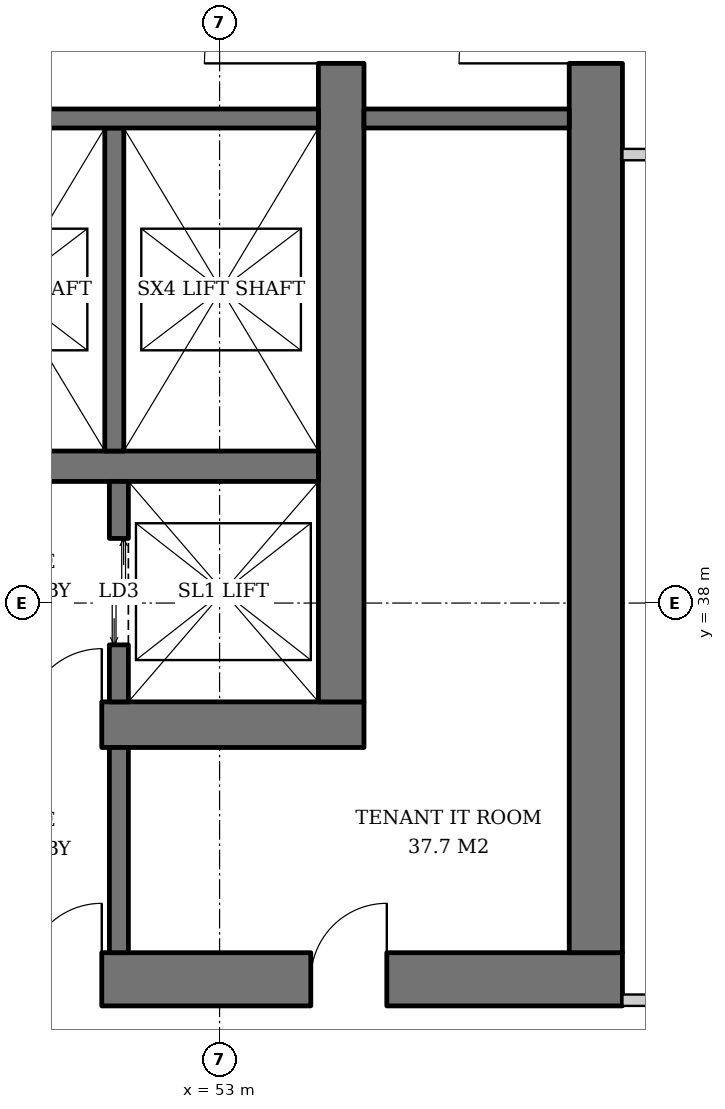
"""IFC4 building model, lengths in metres.
Left out: names, types, materials, properties, quantities, classifications, styles, units other than length and angle.
Written with IfcOpenShell. Run it as: python <this file> out.ifc"""

import sys

from ifc_helpers import new_model, si_unit, direction, frame, frame_2d, origin, place, context, subcontext, project, spatial, rectangle, extrude, element, fill, save


model = new_model("IFC4")
c1 = context("Model", 3, precision=1e-05, world=origin(), true_north=direction((0.0, 1.0)))
c2 = subcontext(c1, "Body", "Model", "MODEL_VIEW")
j1 = project(units=[si_unit("LENGTHUNIT", "METRE"), si_unit("PLANEANGLEUNIT", "RADIAN")], contexts=[c1])
p1 = place(None, origin())
s1 = spatial("IfcSite", under=j1, at=p1, CompositionType="ELEMENT")
p2 = place(p1, origin())
s2 = spatial("IfcBuilding", under=s1, at=p2, CompositionType="ELEMENT")
p3 = place(p2, frame((0.0, 0.0, 123.6)))
s3 = spatial("IfcBuildingStorey", under=s2, at=p3, CompositionType="ELEMENT", Elevation=123.6)
p4 = place(p3, frame((35.1, 36.4, 0.0), z_axis=(0.0, 0.0, 1.0), x_axis=(1.0, 0.0, 0.0)))
e1 = element("IfcWall", 1, at=p4, inside=s3, PredefinedType="SHEAR", context=c2, shape_type="SweptSolid", body=[
    extrude(rectangle(XDim=19.8, YDim=0.6, at=frame_2d((9.9, 0.0))), origin(), (0.0, 0.0, 1.0), 3.8),
])
p5 = place(p4, frame((3.9, 0.0, 0.0)))
e2 = element("IfcOpeningElement", 2, at=p5, cuts=e1, PredefinedType="OPENING", context=c2, shape_type="SweptSolid", body=[
    extrude(rectangle(XDim=1.0, YDim=2.1, at=frame_2d((0.5, 1.05))), frame((0.0, 0.31, 0.0), z_axis=(0.0, -1.0, 0.0), x_axis=(1.0, 0.0, 0.0)), (0.0, 0.0, 1.0), 0.62),
])
p6 = place(p4, frame((15.35, 0.0, 0.0)))
e3 = element("IfcOpeningElement", 3, at=p6, cuts=e1, PredefinedType="OPENING", context=c2, shape_type="SweptSolid", body=[
    extrude(rectangle(XDim=1.0, YDim=2.1, at=frame_2d((0.5, 1.05))), frame((0.0, 0.31, 0.0), z_axis=(0.0, -1.0, 0.0), x_axis=(1.0, 0.0, 0.0)), (0.0, 0.0, 1.0), 0.62),
])
p7 = place(p3, frame((54.6, 36.7, 0.0), z_axis=(0.0, 0.0, 1.0), x_axis=(0.0, 1.0, 0.0)))
e4 = element("IfcWall", 4, at=p7, inside=s3, PredefinedType="SHEAR", context=c2, shape_type="SweptSolid", body=[
    extrude(rectangle(XDim=18.6, YDim=0.6, at=frame_2d((9.3, 0.0))), origin(), (0.0, 0.0, 1.0), 3.8),
])
p8 = place(p7, frame((8.4, 0.0, 0.0)))
e5 = element("IfcOpeningElement", 5, at=p8, cuts=e4, PredefinedType="OPENING", context=c2, shape_type="SweptSolid", body=[
    extrude(rectangle(XDim=1.8, YDim=2.4, at=frame_2d((0.9, 1.2))), frame((0.0, 0.31, 0.0), z_axis=(0.0, -1.0, 0.0), x_axis=(1.0, 0.0, 0.0)), (0.0, 0.0, 1.0), 0.62),
])
p9 = place(p3, frame((31.7, 33.05, 0.0), z_axis=(0.0, 0.0, 1.0), x_axis=(1.0, 0.0, 0.0)))
e6 = element("IfcWall", 6, at=p9, inside=s3, PredefinedType="SHEAR", context=c2, shape_type="SweptSolid", body=[
    extrude(rectangle(XDim=26.6, YDim=0.7, at=frame_2d((13.3, 0.0))), origin(), (0.0, 0.0, 1.0), 3.8),
])
p10 = place(p9, frame((7.3, 0.0, 0.0)))
e7 = element("IfcOpeningElement", 7, at=p10, cuts=e6, PredefinedType="OPENING", context=c2, shape_type="SweptSolid", body=[
    extrude(rectangle(XDim=1.0, YDim=2.1, at=frame_2d((0.5, 1.05))), frame((0.0, 0.36, 0.0), z_axis=(0.0, -1.0, 0.0), x_axis=(1.0, 0.0, 0.0)), (0.0, 0.0, 1.0), 0.72),
])
p11 = place(p9, frame((18.75, 0.0, 0.0)))
e8 = element("IfcOpeningElement", 8, at=p11, cuts=e6, PredefinedType="OPENING", context=c2, shape_type="SweptSolid", body=[
    extrude(rectangle(XDim=1.0, YDim=2.1, at=frame_2d((0.5, 1.05))), frame((0.0, 0.36, 0.0), z_axis=(0.0, -1.0, 0.0), x_axis=(1.0, 0.0, 0.0)), (0.0, 0.0, 1.0), 0.72),
])
p12 = place(p9, frame((3.2, 0.0, 0.0)))
e9 = element("IfcOpeningElement", 9, at=p12, cuts=e6, PredefinedType="OPENING", context=c2, shape_type="SweptSolid", body=[
    extrude(rectangle(XDim=1.0, YDim=2.1, at=frame_2d((0.5, 1.05))), frame((0.0, 0.36, 0.0), z_axis=(0.0, -1.0, 0.0), x_axis=(1.0, 0.0, 0.0)), (0.0, 0.0, 1.0), 0.72),
])
p13 = place(p9, frame((10.42, 0.0, 0.0)))
e10 = element("IfcOpeningElement", 10, at=p13, cuts=e6, PredefinedType="OPENING", context=c2, shape_type="SweptSolid", body=[
    extrude(rectangle(XDim=1.0, YDim=2.1, at=frame_2d((0.5, 1.05))), frame((0.0, 0.36, 0.0), z_axis=(0.0, -1.0, 0.0), x_axis=(1.0, 0.0, 0.0)), (0.0, 0.0, 1.0), 0.72),
])
p14 = place(p9, frame((14.46, 0.0, 0.0)))
e11 = element("IfcOpeningElement", 11, at=p14, cuts=e6, PredefinedType="OPENING", context=c2, shape_type="SweptSolid", body=[
    extrude(rectangle(XDim=1.0, YDim=2.1, at=frame_2d((0.5, 1.05))), frame((0.0, 0.36, 0.0), z_axis=(0.0, -1.0, 0.0), x_axis=(1.0, 0.0, 0.0)), (0.0, 0.0, 1.0), 0.72),
])
p15 = place(p9, frame((22.5, 0.0, 0.0)))
e12 = element("IfcOpeningElement", 12, at=p15, cuts=e6, PredefinedType="OPENING", context=c2, shape_type="SweptSolid", body=[
    extrude(rectangle(XDim=1.0, YDim=2.1, at=frame_2d((0.5, 1.05))), frame((0.0, 0.36, 0.0), z_axis=(0.0, -1.0, 0.0), x_axis=(1.0, 0.0, 0.0)), (0.0, 0.0, 1.0), 0.72),
])
p16 = place(p3, frame((57.95, 33.4, 0.0), z_axis=(0.0, 0.0, 1.0), x_axis=(0.0, 1.0, 0.0)))
e13 = element("IfcWall", 13, at=p16, inside=s3, PredefinedType="SHEAR", context=c2, shape_type="SweptSolid", body=[
    extrude(rectangle(XDim=25.2, YDim=0.7, at=frame_2d((12.6, 0.0))), origin(), (0.0, 0.0, 1.0), 3.8),
])
p17 = place(p16, frame((11.7, 0.0, 0.0)))
e14 = element("IfcOpeningElement", 14, at=p17, cuts=e13, PredefinedType="OPENING", context=c2, shape_type="SweptSolid", body=[
    extrude(rectangle(XDim=1.8, YDim=2.4, at=frame_2d((0.9, 1.2))), frame((0.0, 0.36, 0.0), z_axis=(0.0, -1.0, 0.0), x_axis=(1.0, 0.0, 0.0)), (0.0, 0.0, 1.0), 0.72),
])
p18 = place(p3, frame((35.7, 39.8, 0.0), z_axis=(0.0, 0.0, 1.0), x_axis=(1.0, 0.0, 0.0)))
e15 = element("IfcWall", 15, at=p18, inside=s3, PredefinedType="SHEAR", context=c2, shape_type="SweptSolid", body=[
    extrude(rectangle(XDim=18.6, YDim=0.4, at=frame_2d((9.3, 0.0))), origin(), (0.0, 0.0, 1.0), 3.8),
])
p19 = place(p3, frame((51.675, 36.7, 0.0), z_axis=(0.0, 0.0, 1.0), x_axis=(0.0, 1.0, 0.0)))
e16 = element("IfcWall", 16, at=p19, inside=s3, PredefinedType="SHEAR", context=c2, shape_type="SweptSolid", body=[
    extrude(rectangle(XDim=2.9, YDim=0.25, at=frame_2d((1.45, 0.0))), origin(), (0.0, 0.0, 1.0), 3.8),
])
p20 = place(p19, frame((0.75, 0.0, 0.0)))
e17 = element("IfcOpeningElement", 17, at=p20, cuts=e16, PredefinedType="OPENING", context=c2, shape_type="SweptSolid", body=[
    extrude(rectangle(XDim=1.4, YDim=2.4, at=frame_2d((0.7, 1.2))), frame((0.0, 0.135, 0.0), z_axis=(0.0, -1.0, 0.0), x_axis=(1.0, 0.0, 0.0)), (0.0, 0.0, 1.0), 0.27),
])
p21 = place(p3, frame((51.615, 44.25, 0.0), z_axis=(0.0, 0.0, 1.0), x_axis=(0.0, -1.0, 0.0)))
e18 = element("IfcWall", 18, at=p21, inside=s3, PredefinedType="SHEAR", context=c2, shape_type="SweptSolid", body=[
    extrude(rectangle(XDim=4.25, YDim=0.25, at=frame_2d((2.125, 0.0))), origin(), (0.0, 0.0, 1.0), 3.8),
])
p22 = place(p3, frame((48.93, 44.375, 0.0), z_axis=(0.0, 0.0, 1.0), x_axis=(1.0, 0.0, 0.0)))
e19 = element("IfcWall", 19, at=p22, inside=s3, PredefinedType="SHEAR", context=c2, shape_type="SweptSolid", body=[
    extrude(rectangle(XDim=5.37, YDim=0.25, at=frame_2d((2.685, 0.0))), origin(), (0.0, 0.0, 1.0), 3.8),
])
for number, where, z_axis, x_axis in (
    (20, (54.9, 44.375, 0.0), (0.0, 0.0, 1.0), (1.0, 0.0, 0.0)),
    (21, (51.675, 33.4, 0.0), (0.0, 0.0, 1.0), (0.0, 1.0, 0.0)),
):
    element("IfcWall", number, at=place(p3, frame(where, z_axis=z_axis, x_axis=x_axis)), inside=s3, PredefinedType="SOLIDWALL", context=c2, shape_type="SweptSolid", body=[
        extrude(rectangle(XDim=2.7, YDim=0.25, at=frame_2d((1.35, 0.0))), origin(), (0.0, 0.0, 1.0), 3.62),
    ])
for number, where, z_axis, x_axis in (
    (22, (58.3, 32.775, 0.0), (0.0, 0.0, 1.0), (1.0, 0.0, 0.0)),
    (23, (58.3, 43.9, 0.0), (0.0, 0.0, 1.0), (1.0, 0.0, 0.0)),
):
    element("IfcWall", number, at=place(p3, frame(where, z_axis=z_axis, x_axis=x_axis)), inside=s3, PredefinedType="PARTITIONING", context=c2, shape_type="SweptSolid", body=[
        extrude(rectangle(XDim=1.725, YDim=0.15, at=frame_2d((0.862, 0.0))), origin(), (0.0, 0.0, 1.0), 3.62),
    ])
p23 = place(p20, origin())
e24 = element("IfcDoor", 24, at=p23, inside=s3, OperationType="DOUBLE_DOOR_SLIDING", PredefinedType="DOOR", context=c2, shape_type="SweptSolid", body=[
    extrude(rectangle(XDim=1.4, YDim=2.4, at=frame_2d((0.7, 1.2))), frame((0.0, 0.025, 0.0), z_axis=(0.0, -1.0, 0.0), x_axis=(1.0, 0.0, 0.0)), (0.0, 0.0, 1.0), 0.05),
])
fill(e17, e24)
p24 = place(p8, origin())
e25 = element("IfcDoor", 25, at=p24, inside=s3, OperationType="DOUBLE_DOOR_SINGLE_SWING", PredefinedType="DOOR", context=c2, shape_type="SweptSolid", body=[
    extrude(rectangle(XDim=1.8, YDim=2.4, at=frame_2d((0.9, 1.2))), frame((0.0, 0.025, 0.0), z_axis=(0.0, -1.0, 0.0), x_axis=(1.0, 0.0, 0.0)), (0.0, 0.0, 1.0), 0.05),
])
fill(e5, e25)
p25 = place(p6, origin())
e26 = element("IfcDoor", 26, at=p25, inside=s3, OperationType="SINGLE_SWING_RIGHT", PredefinedType="DOOR", context=c2, shape_type="SweptSolid", body=[
    extrude(rectangle(XDim=1.0, YDim=2.1, at=frame_2d((0.5, 1.05))), frame((0.0, 0.025, 0.0), z_axis=(0.0, -1.0, 0.0), x_axis=(1.0, 0.0, 0.0)), (0.0, 0.0, 1.0), 0.05),
])
fill(e3, e26)
p26 = place(p17, origin())
e27 = element("IfcDoor", 27, at=p26, inside=s3, OperationType="DOUBLE_DOOR_SINGLE_SWING", PredefinedType="DOOR", context=c2, shape_type="SweptSolid", body=[
    extrude(rectangle(XDim=1.8, YDim=2.4, at=frame_2d((0.9, 1.2))), frame((0.0, 0.025, 0.0), z_axis=(0.0, -1.0, 0.0), x_axis=(1.0, 0.0, 0.0)), (0.0, 0.0, 1.0), 0.05),
])
fill(e14, e27)
p27 = place(p11, origin())
e28 = element("IfcDoor", 28, at=p27, inside=s3, OperationType="SINGLE_SWING_RIGHT", PredefinedType="DOOR", context=c2, shape_type="SweptSolid", body=[
    extrude(rectangle(XDim=1.0, YDim=2.1, at=frame_2d((0.5, 1.05))), frame((0.0, 0.025, 0.0), z_axis=(0.0, -1.0, 0.0), x_axis=(1.0, 0.0, 0.0)), (0.0, 0.0, 1.0), 0.05),
])
fill(e8, e28)
p28 = place(p15, origin())
e29 = element("IfcDoor", 29, at=p28, inside=s3, OperationType="SINGLE_SWING_RIGHT", PredefinedType="DOOR", context=c2, shape_type="SweptSolid", body=[
    extrude(rectangle(XDim=1.0, YDim=2.1, at=frame_2d((0.5, 1.05))), frame((0.0, 0.34, 0.0), z_axis=(0.0, -1.0, 0.0), x_axis=(1.0, 0.0, 0.0)), (0.0, 0.0, 1.0), 0.05),
])
fill(e12, e29)
save(model, sys.argv[1])
